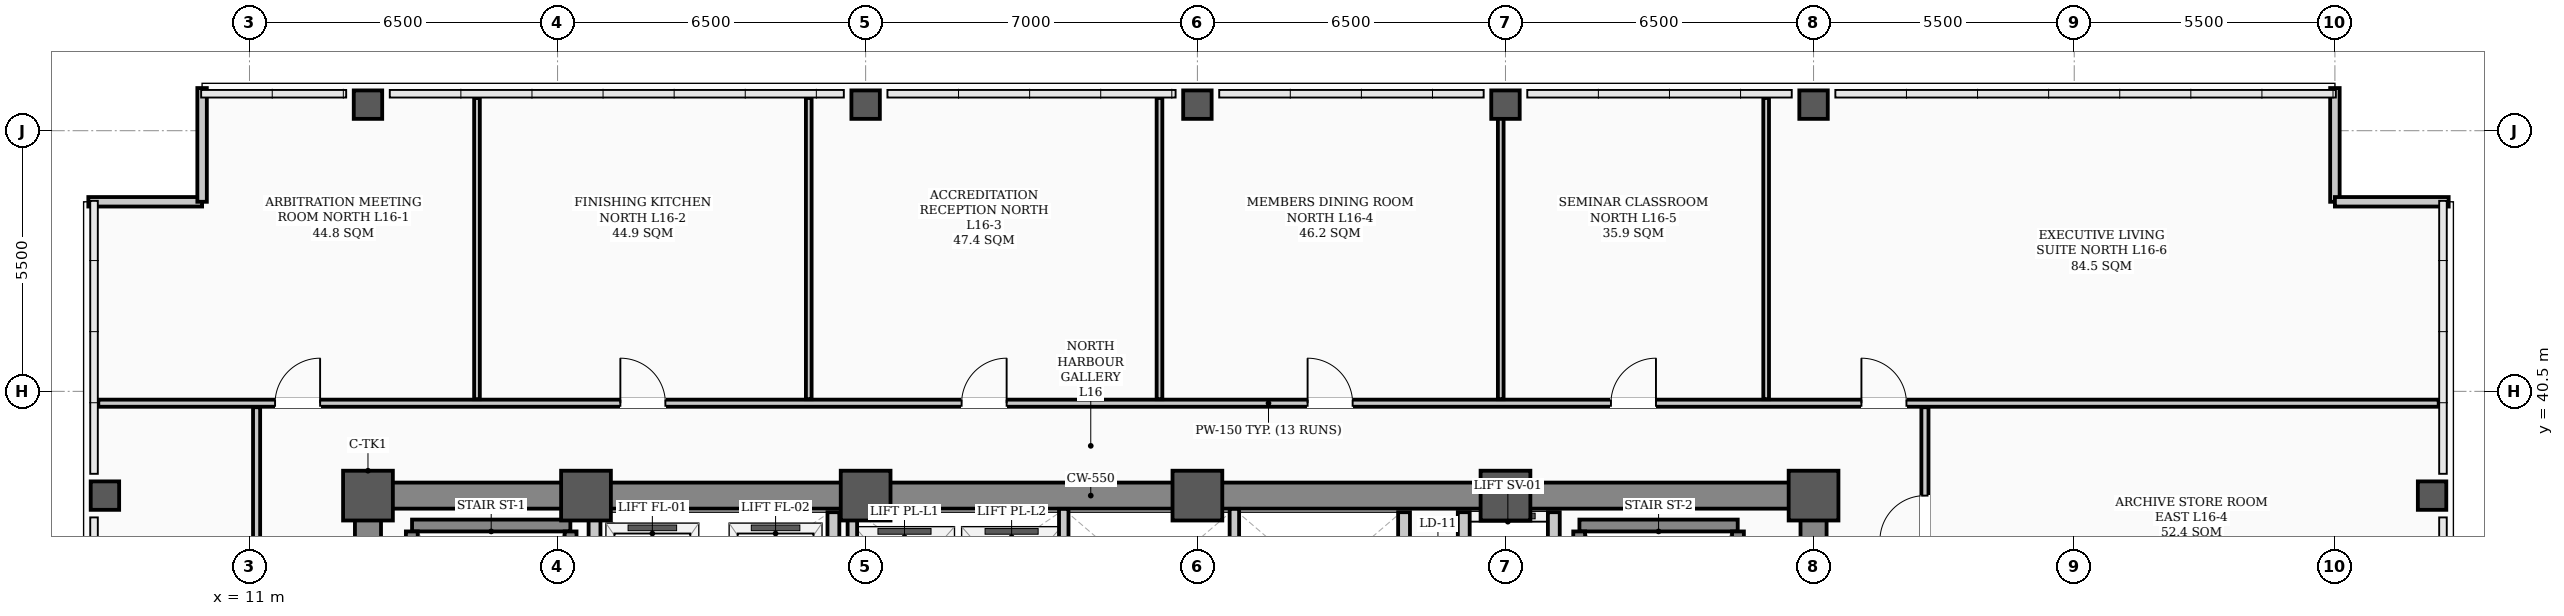
"""IFC4 building model, lengths in metres.
Left out: names, types, materials, properties, quantities, classifications, styles, units other than length and angle.
Written with IfcOpenShell. Run it as: python <this file> out.ifc"""

import sys

from ifc_helpers import new_model, si_unit, direction, frame, frame_2d, origin, origin_2d, place, context, subcontext, project, spatial, rectangle, hollow_rectangle, extrude, element, fill, save


model = new_model("IFC4")
c1 = context("Model", 3, precision=1e-05, world=origin(), true_north=direction((0.0, 1.0)))
c2 = subcontext(c1, "Body", "Model", "MODEL_VIEW")
j1 = project(units=[si_unit("LENGTHUNIT", "METRE"), si_unit("PLANEANGLEUNIT", "RADIAN")], contexts=[c1])
p1 = place(None, origin())
s1 = spatial("IfcSite", under=j1, at=p1, CompositionType="ELEMENT")
p2 = place(p1, origin())
s2 = spatial("IfcBuilding", under=s1, at=p2, CompositionType="ELEMENT")
p3 = place(p2, frame((0.0, 0.0, 65.5)))
s3 = spatial("IfcBuildingStorey", under=s2, at=p3, CompositionType="ELEMENT", Elevation=65.5)
for number, where, z_axis, x_axis in (
    (1, (13.5, 38.3, 0.0), (0.0, 0.0, 1.0), (1.0, 0.0, 0.0)),
    (2, (18.1, 38.3, 0.0), (0.0, 0.0, 1.0), (1.0, 0.0, 0.0)),
    (3, (24.0, 38.3, 0.0), (0.0, 0.0, 1.0), (1.0, 0.0, 0.0)),
    (4, (31.0, 38.3, 0.0), (0.0, 0.0, 1.0), (1.0, 0.0, 0.0)),
    (5, (37.5, 38.3, 0.0), (0.0, 0.0, 1.0), (1.0, 0.0, 0.0)),
    (6, (44.0, 38.3, 0.0), (0.0, 0.0, 1.0), (1.0, 0.0, 0.0)),
):
    element("IfcColumn", number, at=place(p3, frame(where, z_axis=z_axis, x_axis=x_axis)), inside=s3, PredefinedType="COLUMN", context=c2, shape_type="SweptSolid", body=[
        extrude(hollow_rectangle(XDim=1.05, YDim=1.05, WallThickness=0.038, InnerFilletRadius=0.019, OuterFilletRadius=0.057, at=origin_2d()), origin(), (0.0, 0.0, 1.0), 3.9),
    ])
for number, where, z_axis, x_axis in (
    (7, (7.95, 38.3, 0.0), (0.0, 0.0, 1.0), (1.0, 0.0, 0.0)),
    (8, (13.5, 46.55, 0.0), (0.0, 0.0, 1.0), (1.0, 0.0, 0.0)),
    (9, (24.0, 46.55, 0.0), (0.0, 0.0, 1.0), (1.0, 0.0, 0.0)),
    (10, (31.0, 46.55, 0.0), (0.0, 0.0, 1.0), (1.0, 0.0, 0.0)),
    (11, (37.5, 46.55, 0.0), (0.0, 0.0, 1.0), (1.0, 0.0, 0.0)),
    (12, (44.0, 46.55, 0.0), (0.0, 0.0, 1.0), (1.0, 0.0, 0.0)),
    (13, (57.05, 38.3, 0.0), (0.0, 0.0, 1.0), (1.0, 0.0, 0.0)),
):
    element("IfcColumn", number, at=place(p3, frame(where, z_axis=z_axis, x_axis=x_axis)), inside=s3, PredefinedType="COLUMN", context=c2, shape_type="SweptSolid", body=[
        extrude(hollow_rectangle(XDim=0.6, YDim=0.6, WallThickness=0.026, InnerFilletRadius=0.013, OuterFilletRadius=0.039, at=origin_2d()), origin(), (0.0, 0.0, 1.0), 3.9),
    ])
for number, where, z_axis, x_axis in (
    (14, (7.6, 44.5, 0.0), (0.0, 0.0, 1.0), (1.0, 0.0, 0.0)),
    (15, (10.0, 44.5, 0.0), (0.0, 0.0, 1.0), (0.0, 1.0, 0.0)),
    (16, (55.0, 46.9, 0.0), (0.0, 0.0, 1.0), (0.0, -1.0, 0.0)),
    (17, (55.0, 44.5, 0.0), (0.0, 0.0, 1.0), (1.0, 0.0, 0.0)),
):
    element("IfcWall", number, at=place(p3, frame(where, z_axis=z_axis, x_axis=x_axis)), inside=s3, PredefinedType="PARAPET", context=c2, shape_type="SweptSolid", body=[
        extrude(rectangle(XDim=2.4, YDim=0.2, at=frame_2d((1.2, 0.0))), origin(), (0.0, 0.0, 1.0), 1.2),
    ])
p4 = place(p3, frame((13.5, 38.3, 0.0), z_axis=(0.0, 0.0, 1.0), x_axis=(1.0, 0.0, 0.0)))
e18 = element("IfcWall", 18, at=p4, inside=s3, PredefinedType="SHEAR", context=c2, shape_type="SweptSolid", body=[
    extrude(rectangle(XDim=30.5, YDim=0.55, at=frame_2d((15.25, 0.0))), origin(), (0.0, 0.0, 1.0), 3.72),
])
for number, where, z_axis, x_axis in (
    (19, (13.5, 29.35, 0.0), (0.0, 0.0, 1.0), (0.0, 1.0, 0.0)),
    (20, (44.0, 29.35, 0.0), (0.0, 0.0, 1.0), (0.0, 1.0, 0.0)),
):
    element("IfcWall", number, at=place(p3, frame(where, z_axis=z_axis, x_axis=x_axis)), inside=s3, PredefinedType="SHEAR", context=c2, shape_type="SweptSolid", body=[
        extrude(rectangle(XDim=8.6, YDim=0.55, at=frame_2d((4.3, 0.0))), origin(), (0.0, 0.0, 1.0), 3.72),
    ])
p5 = place(p3, frame((14.43, 37.669, 0.0), z_axis=(0.0, 0.0, 1.0), x_axis=(1.0, 0.0, 0.0)))
e21 = element("IfcWall", 21, at=p5, inside=s3, PredefinedType="STANDARD", context=c2, shape_type="SweptSolid", body=[
    extrude(rectangle(XDim=3.34, YDim=0.25, at=frame_2d((1.67, 0.0))), origin(), (0.0, 0.0, 1.0), 3.72),
])
for number, where, z_axis, x_axis in (
    (22, (14.425, 30.36, 0.0), (0.0, 0.0, 1.0), (0.0, 1.0, 0.0)),
    (23, (17.775, 30.36, 0.0), (0.0, 0.0, 1.0), (0.0, 1.0, 0.0)),
):
    element("IfcWall", number, at=place(p3, frame(where, z_axis=z_axis, x_axis=x_axis)), inside=s3, PredefinedType="STANDARD", context=c2, shape_type="SweptSolid", body=[
        extrude(rectangle(XDim=7.184, YDim=0.25, at=frame_2d((3.592, 0.0))), origin(), (0.0, 0.0, 1.0), 3.72),
    ])
p6 = place(p3, frame((39.06, 37.669, 0.0), z_axis=(0.0, 0.0, 1.0), x_axis=(1.0, 0.0, 0.0)))
e24 = element("IfcWall", 24, at=p6, inside=s3, PredefinedType="STANDARD", context=c2, shape_type="SweptSolid", body=[
    extrude(rectangle(XDim=3.34, YDim=0.25, at=frame_2d((1.67, 0.0))), origin(), (0.0, 0.0, 1.0), 3.72),
])
for number, where, z_axis, x_axis in (
    (25, (39.055, 30.36, 0.0), (0.0, 0.0, 1.0), (0.0, 1.0, 0.0)),
    (26, (42.405, 30.36, 0.0), (0.0, 0.0, 1.0), (0.0, 1.0, 0.0)),
):
    element("IfcWall", number, at=place(p3, frame(where, z_axis=z_axis, x_axis=x_axis)), inside=s3, PredefinedType="STANDARD", context=c2, shape_type="SweptSolid", body=[
        extrude(rectangle(XDim=7.184, YDim=0.25, at=frame_2d((3.592, 0.0))), origin(), (0.0, 0.0, 1.0), 3.72),
    ])
p7 = place(p3, frame((36.62, 31.95, 0.0), z_axis=(0.0, 0.0, 1.0), x_axis=(0.0, 1.0, 0.0)))
e27 = element("IfcWall", 27, at=p7, inside=s3, PredefinedType="STANDARD", context=c2, shape_type="SweptSolid", body=[
    extrude(rectangle(XDim=6.0, YDim=0.25, at=frame_2d((3.0, 0.0))), origin(), (0.0, 0.0, 1.0), 3.3),
])
p8 = place(p7, frame((0.9, 0.0, 0.0)))
e28 = element("IfcOpeningElement", 28, at=p8, cuts=e27, PredefinedType="OPENING", context=c2, shape_type="SweptSolid", body=[
    extrude(rectangle(XDim=1.1, YDim=2.08, at=frame_2d((0.55, 1.04))), frame((0.0, 0.135, 0.0), z_axis=(0.0, -1.0, 0.0), x_axis=(1.0, 0.0, 0.0)), (0.0, 0.0, 1.0), 0.27),
])
p9 = place(p7, frame((4.0, 0.0, 0.0)))
e29 = element("IfcOpeningElement", 29, at=p9, cuts=e27, PredefinedType="OPENING", context=c2, shape_type="SweptSolid", body=[
    extrude(rectangle(XDim=1.1, YDim=2.08, at=frame_2d((0.55, 1.04))), frame((0.0, 0.135, 0.0), z_axis=(0.0, -1.0, 0.0), x_axis=(1.0, 0.0, 0.0)), (0.0, 0.0, 1.0), 0.27),
])
p10 = place(p3, frame((38.52, 31.95, 0.0), z_axis=(0.0, 0.0, 1.0), x_axis=(0.0, 1.0, 0.0)))
e30 = element("IfcWall", 30, at=p10, inside=s3, PredefinedType="STANDARD", context=c2, shape_type="SweptSolid", body=[
    extrude(rectangle(XDim=6.0, YDim=0.25, at=frame_2d((3.0, 0.0))), origin(), (0.0, 0.0, 1.0), 3.3),
])
for number, where, z_axis, x_axis in (
    (31, (18.28, 34.62, 0.0), (0.0, 0.0, 1.0), (0.0, 1.0, 0.0)),
    (32, (23.32, 34.62, 0.0), (0.0, 0.0, 1.0), (0.0, 1.0, 0.0)),
):
    element("IfcWall", number, at=place(p3, frame(where, z_axis=z_axis, x_axis=x_axis)), inside=s3, PredefinedType="STANDARD", context=c2, shape_type="SweptSolid", body=[
        extrude(rectangle(XDim=3.33, YDim=0.25, at=frame_2d((1.665, 0.0))), origin(), (0.0, 0.0, 1.0), 3.3),
    ])
p11 = place(p3, frame((35.36, 34.9, 0.0), z_axis=(0.0, 0.0, 1.0), x_axis=(0.0, 1.0, 0.0)))
e33 = element("IfcWall", 33, at=p11, inside=s3, PredefinedType="STANDARD", context=c2, shape_type="SweptSolid", body=[
    extrude(rectangle(XDim=3.05, YDim=0.25, at=frame_2d((1.525, 0.0))), origin(), (0.0, 0.0, 1.0), 3.3),
])
p12 = place(p3, frame((7.81, 40.25, 0.0), z_axis=(0.0, 0.0, 1.0), x_axis=(1.0, 0.0, 0.0)))
e34 = element("IfcWall", 34, at=p12, inside=s3, PredefinedType="PARTITIONING", context=c2, shape_type="SweptSolid", body=[
    extrude(rectangle(XDim=49.38, YDim=0.15, at=frame_2d((24.69, 0.0))), origin(), (0.0, 0.0, 1.0), 3.1),
])
p13 = place(p12, frame((3.73, 0.0, 0.0)))
e35 = element("IfcOpeningElement", 35, at=p13, cuts=e34, PredefinedType="OPENING", context=c2, shape_type="SweptSolid", body=[
    extrude(rectangle(XDim=0.95, YDim=2.08, at=frame_2d((0.475, 1.04))), frame((0.0, 0.085, 0.0), z_axis=(0.0, -1.0, 0.0), x_axis=(1.0, 0.0, 0.0)), (0.0, 0.0, 1.0), 0.17),
])
p14 = place(p12, frame((11.015, 0.0, 0.0)))
e36 = element("IfcOpeningElement", 36, at=p14, cuts=e34, PredefinedType="OPENING", context=c2, shape_type="SweptSolid", body=[
    extrude(rectangle(XDim=0.95, YDim=2.08, at=frame_2d((0.475, 1.04))), frame((0.0, 0.085, 0.0), z_axis=(0.0, -1.0, 0.0), x_axis=(1.0, 0.0, 0.0)), (0.0, 0.0, 1.0), 0.17),
])
p15 = place(p12, frame((18.215, 0.0, 0.0)))
e37 = element("IfcOpeningElement", 37, at=p15, cuts=e34, PredefinedType="OPENING", context=c2, shape_type="SweptSolid", body=[
    extrude(rectangle(XDim=0.95, YDim=2.08, at=frame_2d((0.475, 1.04))), frame((0.0, 0.085, 0.0), z_axis=(0.0, -1.0, 0.0), x_axis=(1.0, 0.0, 0.0)), (0.0, 0.0, 1.0), 0.17),
])
p16 = place(p12, frame((25.515, 0.0, 0.0)))
e38 = element("IfcOpeningElement", 38, at=p16, cuts=e34, PredefinedType="OPENING", context=c2, shape_type="SweptSolid", body=[
    extrude(rectangle(XDim=0.95, YDim=2.08, at=frame_2d((0.475, 1.04))), frame((0.0, 0.085, 0.0), z_axis=(0.0, -1.0, 0.0), x_axis=(1.0, 0.0, 0.0)), (0.0, 0.0, 1.0), 0.17),
])
p17 = place(p12, frame((31.915, 0.0, 0.0)))
e39 = element("IfcOpeningElement", 39, at=p17, cuts=e34, PredefinedType="OPENING", context=c2, shape_type="SweptSolid", body=[
    extrude(rectangle(XDim=0.95, YDim=2.08, at=frame_2d((0.475, 1.04))), frame((0.0, 0.085, 0.0), z_axis=(0.0, -1.0, 0.0), x_axis=(1.0, 0.0, 0.0)), (0.0, 0.0, 1.0), 0.17),
])
p18 = place(p12, frame((37.2, 0.0, 0.0)))
e40 = element("IfcOpeningElement", 40, at=p18, cuts=e34, PredefinedType="OPENING", context=c2, shape_type="SweptSolid", body=[
    extrude(rectangle(XDim=0.95, YDim=2.08, at=frame_2d((0.475, 1.04))), frame((0.0, 0.085, 0.0), z_axis=(0.0, -1.0, 0.0), x_axis=(1.0, 0.0, 0.0)), (0.0, 0.0, 1.0), 0.17),
])
p19 = place(p3, frame((11.15, 17.635, 0.0), z_axis=(0.0, 0.0, 1.0), x_axis=(0.0, 1.0, 0.0)))
e41 = element("IfcWall", 41, at=p19, inside=s3, PredefinedType="PARTITIONING", context=c2, shape_type="SweptSolid", body=[
    extrude(rectangle(XDim=22.53, YDim=0.15, at=frame_2d((11.265, 0.0))), origin(), (0.0, 0.0, 1.0), 3.0),
])
p20 = place(p19, frame((0.64, 0.0, 0.0)))
e42 = element("IfcOpeningElement", 42, at=p20, cuts=e41, PredefinedType="OPENING", context=c2, shape_type="SweptSolid", body=[
    extrude(rectangle(XDim=0.95, YDim=2.08, at=frame_2d((0.475, 1.04))), frame((0.0, 0.085, 0.0), z_axis=(0.0, -1.0, 0.0), x_axis=(1.0, 0.0, 0.0)), (0.0, 0.0, 1.0), 0.17),
])
p21 = place(p3, frame((46.35, 17.635, 0.0), z_axis=(0.0, 0.0, 1.0), x_axis=(0.0, 1.0, 0.0)))
e43 = element("IfcWall", 43, at=p21, inside=s3, PredefinedType="PARTITIONING", context=c2, shape_type="SweptSolid", body=[
    extrude(rectangle(XDim=22.53, YDim=0.15, at=frame_2d((11.265, 0.0))), origin(), (0.0, 0.0, 1.0), 3.0),
])
p22 = place(p21, frame((3.065, 0.0, 0.0)))
e44 = element("IfcOpeningElement", 44, at=p22, cuts=e43, PredefinedType="OPENING", context=c2, shape_type="SweptSolid", body=[
    extrude(rectangle(XDim=0.95, YDim=2.08, at=frame_2d((0.475, 1.04))), frame((0.0, 0.085, 0.0), z_axis=(0.0, -1.0, 0.0), x_axis=(1.0, 0.0, 0.0)), (0.0, 0.0, 1.0), 0.17),
])
p23 = place(p21, frame((9.39, 0.0, 0.0)))
e45 = element("IfcOpeningElement", 45, at=p23, cuts=e43, PredefinedType="OPENING", context=c2, shape_type="SweptSolid", body=[
    extrude(rectangle(XDim=0.95, YDim=2.08, at=frame_2d((0.475, 1.04))), frame((0.0, 0.085, 0.0), z_axis=(0.0, -1.0, 0.0), x_axis=(1.0, 0.0, 0.0)), (0.0, 0.0, 1.0), 0.17),
])
p24 = place(p21, frame((14.69, 0.0, 0.0)))
e46 = element("IfcOpeningElement", 46, at=p24, cuts=e43, PredefinedType="OPENING", context=c2, shape_type="SweptSolid", body=[
    extrude(rectangle(XDim=0.95, YDim=2.08, at=frame_2d((0.475, 1.04))), frame((0.0, 0.085, 0.0), z_axis=(0.0, -1.0, 0.0), x_axis=(1.0, 0.0, 0.0)), (0.0, 0.0, 1.0), 0.17),
])
p25 = place(p21, frame((19.715, 0.0, 0.0)))
e47 = element("IfcOpeningElement", 47, at=p25, cuts=e43, PredefinedType="OPENING", context=c2, shape_type="SweptSolid", body=[
    extrude(rectangle(XDim=0.95, YDim=2.08, at=frame_2d((0.475, 1.04))), frame((0.0, 0.085, 0.0), z_axis=(0.0, -1.0, 0.0), x_axis=(1.0, 0.0, 0.0)), (0.0, 0.0, 1.0), 0.17),
])
for number, where, z_axis, x_axis in (
    (48, (15.8, 40.335, 0.0), (0.0, 0.0, 1.0), (0.0, 1.0, 0.0)),
    (49, (22.8, 40.335, 0.0), (0.0, 0.0, 1.0), (0.0, 1.0, 0.0)),
    (50, (30.2, 40.335, 0.0), (0.0, 0.0, 1.0), (0.0, 1.0, 0.0)),
):
    element("IfcWall", number, at=place(p3, frame(where, z_axis=z_axis, x_axis=x_axis)), inside=s3, PredefinedType="PARTITIONING", context=c2, shape_type="SweptSolid", body=[
        extrude(rectangle(XDim=6.355, YDim=0.12, at=frame_2d((3.177, 0.0))), origin(), (0.0, 0.0, 1.0), 3.212),
    ])
p26 = place(p3, frame((37.4, 40.335, 0.0), z_axis=(0.0, 0.0, 1.0), x_axis=(0.0, 1.0, 0.0)))
e51 = element("IfcWall", 51, at=p26, inside=s3, PredefinedType="PARTITIONING", context=c2, shape_type="SweptSolid", body=[
    extrude(rectangle(XDim=6.355, YDim=0.12, at=frame_2d((3.177, 0.0))), origin(), (0.0, 0.0, 1.0), 3.1),
])
p27 = place(p3, frame((43.0, 40.335, 0.0), z_axis=(0.0, 0.0, 1.0), x_axis=(0.0, 1.0, 0.0)))
e52 = element("IfcWall", 52, at=p27, inside=s3, PredefinedType="PARTITIONING", context=c2, shape_type="SweptSolid", body=[
    extrude(rectangle(XDim=6.355, YDim=0.12, at=frame_2d((3.177, 0.0))), origin(), (0.0, 0.0, 1.0), 3.212),
])
p28 = place(p3, frame((23.72, 34.9, 0.0), z_axis=(0.0, 0.0, 1.0), x_axis=(0.0, 1.0, 0.0)))
e53 = element("IfcWall", 53, at=p28, inside=s3, PredefinedType="STANDARD", context=c2, shape_type="SweptSolid", body=[
    extrude(rectangle(XDim=3.12, YDim=0.2, at=frame_2d((1.56, 0.0))), origin(), (0.0, 0.0, 1.0), 3.1),
])
for number, where, z_axis, x_axis in (
    (54, (28.18, 34.9, 0.0), (0.0, 0.0, 1.0), (0.0, 1.0, 0.0)),
    (55, (31.78, 34.9, 0.0), (0.0, 0.0, 1.0), (0.0, 1.0, 0.0)),
):
    element("IfcWall", number, at=place(p3, frame(where, z_axis=z_axis, x_axis=x_axis)), inside=s3, PredefinedType="STANDARD", context=c2, shape_type="SweptSolid", body=[
        extrude(rectangle(XDim=3.12, YDim=0.2, at=frame_2d((1.56, 0.0))), origin(), (0.0, 0.0, 1.0), 3.3),
    ])
p29 = place(p25, origin())
e56 = element("IfcDoor", 56, at=p29, inside=s3, OperationType="SINGLE_SWING_LEFT", PredefinedType="DOOR", context=c2, shape_type="SweptSolid", body=[
    extrude(rectangle(XDim=0.95, YDim=2.08, at=frame_2d((0.475, 1.04))), frame((0.0, 0.025, 0.0), z_axis=(0.0, -1.0, 0.0), x_axis=(1.0, 0.0, 0.0)), (0.0, 0.0, 1.0), 0.05),
])
fill(e47, e56)
p30 = place(p13, origin())
e57 = element("IfcDoor", 57, at=p30, inside=s3, OperationType="SINGLE_SWING_RIGHT", PredefinedType="DOOR", context=c2, shape_type="SweptSolid", body=[
    extrude(rectangle(XDim=0.95, YDim=2.08, at=frame_2d((0.475, 1.04))), frame((0.0, 0.025, 0.0), z_axis=(0.0, -1.0, 0.0), x_axis=(1.0, 0.0, 0.0)), (0.0, 0.0, 1.0), 0.05),
])
fill(e35, e57)
p31 = place(p14, origin())
e58 = element("IfcDoor", 58, at=p31, inside=s3, OperationType="SINGLE_SWING_LEFT", PredefinedType="DOOR", context=c2, shape_type="SweptSolid", body=[
    extrude(rectangle(XDim=0.95, YDim=2.08, at=frame_2d((0.475, 1.04))), frame((0.0, 0.025, 0.0), z_axis=(0.0, -1.0, 0.0), x_axis=(1.0, 0.0, 0.0)), (0.0, 0.0, 1.0), 0.05),
])
fill(e36, e58)
p32 = place(p15, origin())
e59 = element("IfcDoor", 59, at=p32, inside=s3, OperationType="SINGLE_SWING_RIGHT", PredefinedType="DOOR", context=c2, shape_type="SweptSolid", body=[
    extrude(rectangle(XDim=0.95, YDim=2.08, at=frame_2d((0.475, 1.04))), frame((0.0, 0.025, 0.0), z_axis=(0.0, -1.0, 0.0), x_axis=(1.0, 0.0, 0.0)), (0.0, 0.0, 1.0), 0.05),
])
fill(e37, e59)
p33 = place(p16, origin())
e60 = element("IfcDoor", 60, at=p33, inside=s3, OperationType="SINGLE_SWING_LEFT", PredefinedType="DOOR", context=c2, shape_type="SweptSolid", body=[
    extrude(rectangle(XDim=0.95, YDim=2.08, at=frame_2d((0.475, 1.04))), frame((0.0, 0.025, 0.0), z_axis=(0.0, -1.0, 0.0), x_axis=(1.0, 0.0, 0.0)), (0.0, 0.0, 1.0), 0.05),
])
fill(e38, e60)
p34 = place(p17, origin())
e61 = element("IfcDoor", 61, at=p34, inside=s3, OperationType="SINGLE_SWING_RIGHT", PredefinedType="DOOR", context=c2, shape_type="SweptSolid", body=[
    extrude(rectangle(XDim=0.95, YDim=2.08, at=frame_2d((0.475, 1.04))), frame((0.0, 0.025, 0.0), z_axis=(0.0, -1.0, 0.0), x_axis=(1.0, 0.0, 0.0)), (0.0, 0.0, 1.0), 0.05),
])
fill(e39, e61)
p35 = place(p18, origin())
e62 = element("IfcDoor", 62, at=p35, inside=s3, OperationType="SINGLE_SWING_LEFT", PredefinedType="DOOR", context=c2, shape_type="SweptSolid", body=[
    extrude(rectangle(XDim=0.95, YDim=2.08, at=frame_2d((0.475, 1.04))), frame((0.0, 0.025, 0.0), z_axis=(0.0, -1.0, 0.0), x_axis=(1.0, 0.0, 0.0)), (0.0, 0.0, 1.0), 0.05),
])
fill(e40, e62)
save(model, sys.argv[1])
